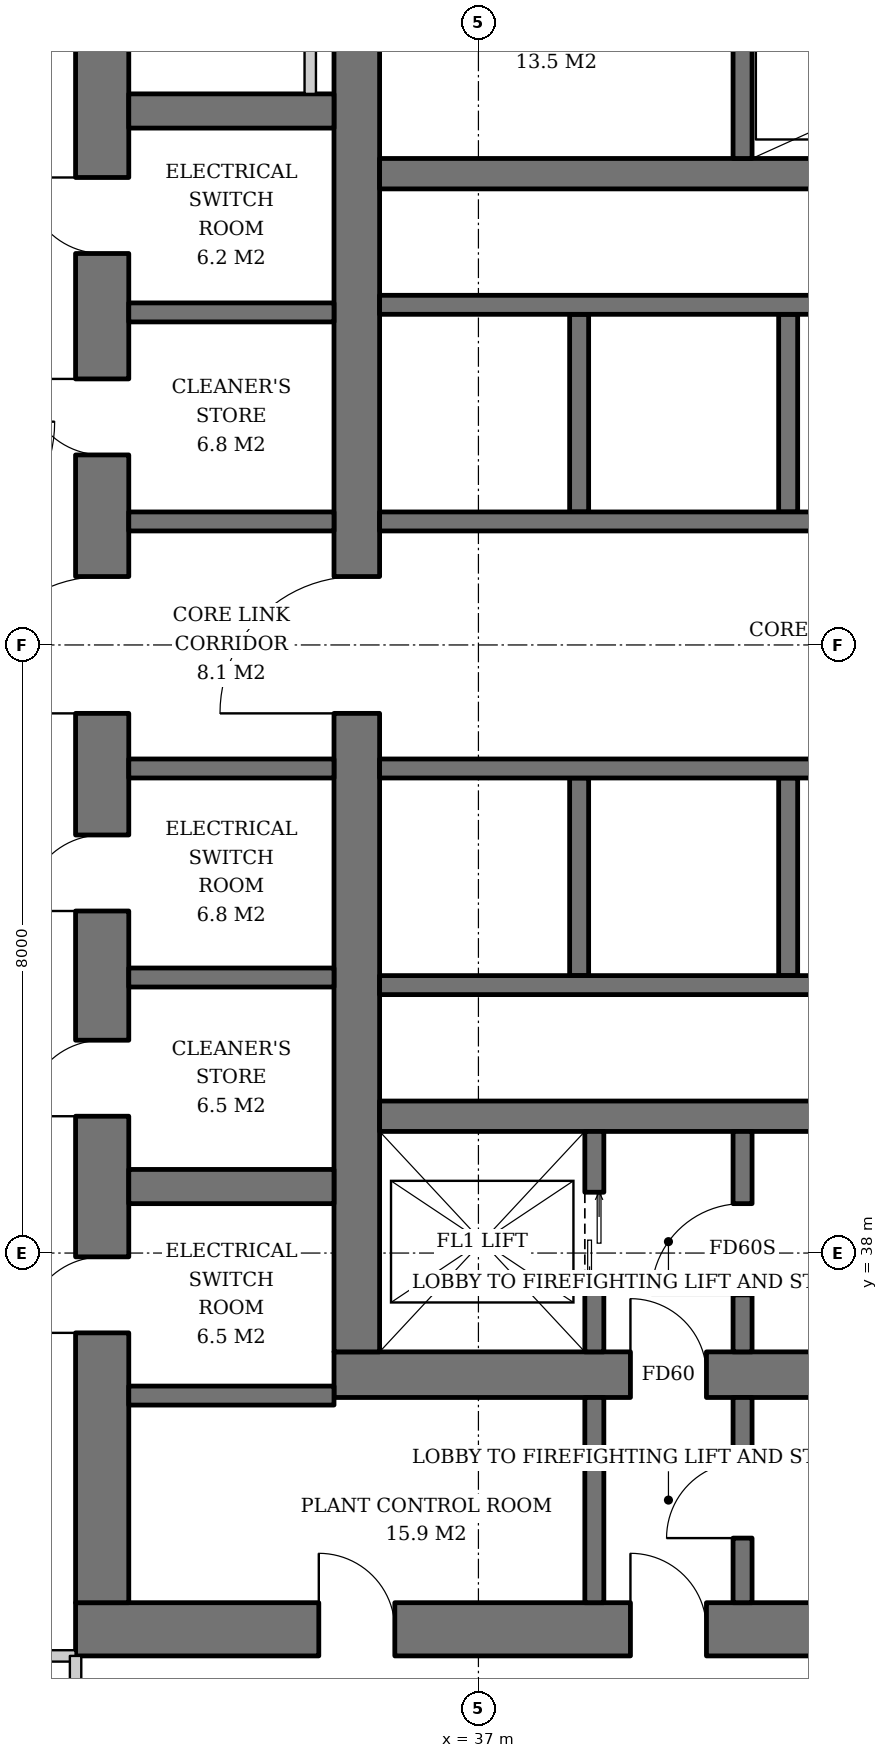
"""IFC4 building model, lengths in metres.
Left out: names, types, materials, properties, quantities, classifications, styles, units other than length and angle.
Written with IfcOpenShell. Run it as: python <this file> out.ifc"""

import sys

from ifc_helpers import new_model, si_unit, direction, frame, frame_2d, origin, origin_2d, place, context, subcontext, project, spatial, rectangle, extrude, element, fill, save


model = new_model("IFC4")
c1 = context("Model", 3, precision=1e-05, world=origin(), true_north=direction((0.0, 1.0)))
c2 = subcontext(c1, "Body", "Model", "MODEL_VIEW")
j1 = project(units=[si_unit("LENGTHUNIT", "METRE"), si_unit("PLANEANGLEUNIT", "RADIAN")], contexts=[c1])
p1 = place(None, origin())
s1 = spatial("IfcSite", under=j1, at=p1, CompositionType="ELEMENT")
p2 = place(p1, origin())
s2 = spatial("IfcBuilding", under=s1, at=p2, CompositionType="ELEMENT")
p3 = place(p2, frame((0.0, 0.0, 161.6)))
s3 = spatial("IfcBuildingStorey", under=s2, at=p3, CompositionType="ELEMENT", Elevation=161.6)
p4 = place(p3, frame((29.593, 30.593, 0.0), z_axis=(0.031964207655, 0.031964207655, 0.998977766949), x_axis=(-0.707106781187, 0.707106781187, 0.0)))
e1 = element("IfcColumn", 1, at=p4, inside=s3, PredefinedType="COLUMN", context=c2, shape_type="SweptSolid", body=[
    extrude(rectangle(XDim=2.4, YDim=2.4, at=origin_2d()), origin(), (0.0, 0.0, 1.0), 3.804),
])
p5 = place(p3, frame((35.1, 36.4, 0.0), z_axis=(0.0, 0.0, 1.0), x_axis=(1.0, 0.0, 0.0)))
e2 = element("IfcWall", 2, at=p5, inside=s3, PredefinedType="SHEAR", context=c2, shape_type="SweptSolid", body=[
    extrude(rectangle(XDim=19.8, YDim=0.6, at=frame_2d((9.9, 0.0))), origin(), (0.0, 0.0, 1.0), 3.8),
])
p6 = place(p5, frame((3.9, 0.0, 0.0)))
e3 = element("IfcOpeningElement", 3, at=p6, cuts=e2, PredefinedType="OPENING", context=c2, shape_type="SweptSolid", body=[
    extrude(rectangle(XDim=1.0, YDim=2.1, at=frame_2d((0.5, 1.05))), frame((0.0, 0.31, 0.0), z_axis=(0.0, -1.0, 0.0), x_axis=(1.0, 0.0, 0.0)), (0.0, 0.0, 1.0), 0.62),
])
p7 = place(p5, frame((15.35, 0.0, 0.0)))
e4 = element("IfcOpeningElement", 4, at=p7, cuts=e2, PredefinedType="OPENING", context=c2, shape_type="SweptSolid", body=[
    extrude(rectangle(XDim=1.0, YDim=2.1, at=frame_2d((0.5, 1.05))), frame((0.0, 0.31, 0.0), z_axis=(0.0, -1.0, 0.0), x_axis=(1.0, 0.0, 0.0)), (0.0, 0.0, 1.0), 0.62),
])
p8 = place(p3, frame((35.4, 36.7, 0.0), z_axis=(0.0, 0.0, 1.0), x_axis=(0.0, 1.0, 0.0)))
e5 = element("IfcWall", 5, at=p8, inside=s3, PredefinedType="SHEAR", context=c2, shape_type="SweptSolid", body=[
    extrude(rectangle(XDim=18.6, YDim=0.6, at=frame_2d((9.3, 0.0))), origin(), (0.0, 0.0, 1.0), 3.8),
])
p9 = place(p8, frame((8.4, 0.0, 0.0)))
e6 = element("IfcOpeningElement", 6, at=p9, cuts=e5, PredefinedType="OPENING", context=c2, shape_type="SweptSolid", body=[
    extrude(rectangle(XDim=1.8, YDim=2.4, at=frame_2d((0.9, 1.2))), frame((0.0, 0.31, 0.0), z_axis=(0.0, -1.0, 0.0), x_axis=(1.0, 0.0, 0.0)), (0.0, 0.0, 1.0), 0.62),
])
p10 = place(p3, frame((31.7, 33.05, 0.0), z_axis=(0.0, 0.0, 1.0), x_axis=(1.0, 0.0, 0.0)))
e7 = element("IfcWall", 7, at=p10, inside=s3, PredefinedType="SHEAR", context=c2, shape_type="SweptSolid", body=[
    extrude(rectangle(XDim=26.6, YDim=0.7, at=frame_2d((13.3, 0.0))), origin(), (0.0, 0.0, 1.0), 3.8),
])
p11 = place(p10, frame((7.3, 0.0, 0.0)))
e8 = element("IfcOpeningElement", 8, at=p11, cuts=e7, PredefinedType="OPENING", context=c2, shape_type="SweptSolid", body=[
    extrude(rectangle(XDim=1.0, YDim=2.1, at=frame_2d((0.5, 1.05))), frame((0.0, 0.36, 0.0), z_axis=(0.0, -1.0, 0.0), x_axis=(1.0, 0.0, 0.0)), (0.0, 0.0, 1.0), 0.72),
])
p12 = place(p10, frame((18.75, 0.0, 0.0)))
e9 = element("IfcOpeningElement", 9, at=p12, cuts=e7, PredefinedType="OPENING", context=c2, shape_type="SweptSolid", body=[
    extrude(rectangle(XDim=1.0, YDim=2.1, at=frame_2d((0.5, 1.05))), frame((0.0, 0.36, 0.0), z_axis=(0.0, -1.0, 0.0), x_axis=(1.0, 0.0, 0.0)), (0.0, 0.0, 1.0), 0.72),
])
p13 = place(p10, frame((3.2, 0.0, 0.0)))
e10 = element("IfcOpeningElement", 10, at=p13, cuts=e7, PredefinedType="OPENING", context=c2, shape_type="SweptSolid", body=[
    extrude(rectangle(XDim=1.0, YDim=2.1, at=frame_2d((0.5, 1.05))), frame((0.0, 0.36, 0.0), z_axis=(0.0, -1.0, 0.0), x_axis=(1.0, 0.0, 0.0)), (0.0, 0.0, 1.0), 0.72),
])
p14 = place(p3, frame((32.05, 33.4, 0.0), z_axis=(0.0, 0.0, 1.0), x_axis=(0.0, 1.0, 0.0)))
e11 = element("IfcWall", 11, at=p14, inside=s3, PredefinedType="SHEAR", context=c2, shape_type="SweptSolid", body=[
    extrude(rectangle(XDim=25.2, YDim=0.7, at=frame_2d((12.6, 0.0))), origin(), (0.0, 0.0, 1.0), 3.8),
])
p15 = place(p14, frame((11.7, 0.0, 0.0)))
e12 = element("IfcOpeningElement", 12, at=p15, cuts=e11, PredefinedType="OPENING", context=c2, shape_type="SweptSolid", body=[
    extrude(rectangle(XDim=1.8, YDim=2.4, at=frame_2d((0.9, 1.2))), frame((0.0, 0.36, 0.0), z_axis=(0.0, -1.0, 0.0), x_axis=(1.0, 0.0, 0.0)), (0.0, 0.0, 1.0), 0.72),
])
p16 = place(p14, frame((3.55, 0.0, 0.0)))
e13 = element("IfcOpeningElement", 13, at=p16, cuts=e11, PredefinedType="OPENING", context=c2, shape_type="SweptSolid", body=[
    extrude(rectangle(XDim=1.0, YDim=2.1, at=frame_2d((0.5, 1.05))), frame((0.0, 0.36, 0.0), z_axis=(0.0, -1.0, 0.0), x_axis=(1.0, 0.0, 0.0)), (0.0, 0.0, 1.0), 0.72),
])
p17 = place(p14, frame((6.4, 0.0, 0.0)))
e14 = element("IfcOpeningElement", 14, at=p17, cuts=e11, PredefinedType="OPENING", context=c2, shape_type="SweptSolid", body=[
    extrude(rectangle(XDim=1.0, YDim=2.1, at=frame_2d((0.5, 1.05))), frame((0.0, 0.36, 0.0), z_axis=(0.0, -1.0, 0.0), x_axis=(1.0, 0.0, 0.0)), (0.0, 0.0, 1.0), 0.72),
])
p18 = place(p14, frame((9.1, 0.0, 0.0)))
e15 = element("IfcOpeningElement", 15, at=p18, cuts=e11, PredefinedType="OPENING", context=c2, shape_type="SweptSolid", body=[
    extrude(rectangle(XDim=1.0, YDim=2.1, at=frame_2d((0.5, 1.05))), frame((0.0, 0.36, 0.0), z_axis=(0.0, -1.0, 0.0), x_axis=(1.0, 0.0, 0.0)), (0.0, 0.0, 1.0), 0.72),
])
p19 = place(p14, frame((15.1, 0.0, 0.0)))
e16 = element("IfcOpeningElement", 16, at=p19, cuts=e11, PredefinedType="OPENING", context=c2, shape_type="SweptSolid", body=[
    extrude(rectangle(XDim=1.0, YDim=2.1, at=frame_2d((0.5, 1.05))), frame((0.0, 0.36, 0.0), z_axis=(0.0, -1.0, 0.0), x_axis=(1.0, 0.0, 0.0)), (0.0, 0.0, 1.0), 0.72),
])
p20 = place(p14, frame((17.75, 0.0, 0.0)))
e17 = element("IfcOpeningElement", 17, at=p20, cuts=e11, PredefinedType="OPENING", context=c2, shape_type="SweptSolid", body=[
    extrude(rectangle(XDim=1.0, YDim=2.1, at=frame_2d((0.5, 1.05))), frame((0.0, 0.36, 0.0), z_axis=(0.0, -1.0, 0.0), x_axis=(1.0, 0.0, 0.0)), (0.0, 0.0, 1.0), 0.72),
])
for number, where, z_axis, x_axis in (
    (18, (35.7, 39.8, 0.0), (0.0, 0.0, 1.0), (1.0, 0.0, 0.0)),
    (19, (35.7, 52.2, 0.0), (0.0, 0.0, 1.0), (1.0, 0.0, 0.0)),
):
    element("IfcWall", number, at=place(p3, frame(where, z_axis=z_axis, x_axis=x_axis)), inside=s3, PredefinedType="SHEAR", context=c2, shape_type="SweptSolid", body=[
        extrude(rectangle(XDim=18.6, YDim=0.4, at=frame_2d((9.3, 0.0))), origin(), (0.0, 0.0, 1.0), 3.8),
    ])
p21 = place(p3, frame((38.525, 36.7, 0.0), z_axis=(0.0, 0.0, 1.0), x_axis=(0.0, 1.0, 0.0)))
e20 = element("IfcWall", 20, at=p21, inside=s3, PredefinedType="SHEAR", context=c2, shape_type="SweptSolid", body=[
    extrude(rectangle(XDim=2.9, YDim=0.25, at=frame_2d((1.45, 0.0))), origin(), (0.0, 0.0, 1.0), 3.8),
])
p22 = place(p21, frame((0.8, 0.0, 0.0)))
e21 = element("IfcOpeningElement", 21, at=p22, cuts=e20, PredefinedType="OPENING", context=c2, shape_type="SweptSolid", body=[
    extrude(rectangle(XDim=1.3, YDim=2.2, at=frame_2d((0.65, 1.1))), frame((0.0, 0.135, 0.0), z_axis=(0.0, -1.0, 0.0), x_axis=(1.0, 0.0, 0.0)), (0.0, 0.0, 1.0), 0.27),
])
p23 = place(p3, frame((40.475, 36.7, 0.0), z_axis=(0.0, 0.0, 1.0), x_axis=(0.0, 1.0, 0.0)))
e22 = element("IfcWall", 22, at=p23, inside=s3, PredefinedType="SHEAR", context=c2, shape_type="SweptSolid", body=[
    extrude(rectangle(XDim=2.9, YDim=0.25, at=frame_2d((1.45, 0.0))), origin(), (0.0, 0.0, 1.0), 3.8),
])
p24 = place(p23, frame((0.75, 0.0, 0.0)))
e23 = element("IfcOpeningElement", 23, at=p24, cuts=e22, PredefinedType="OPENING", context=c2, shape_type="SweptSolid", body=[
    extrude(rectangle(XDim=1.2, YDim=2.1, at=frame_2d((0.6, 1.05))), frame((0.0, 0.135, 0.0), z_axis=(0.0, -1.0, 0.0), x_axis=(1.0, 0.0, 0.0)), (0.0, 0.0, 1.0), 0.27),
])
p25 = place(p3, frame((40.475, 52.4, 0.0), z_axis=(0.0, 0.0, 1.0), x_axis=(0.0, 1.0, 0.0)))
e24 = element("IfcWall", 24, at=p25, inside=s3, PredefinedType="SHEAR", context=c2, shape_type="SweptSolid", body=[
    extrude(rectangle(XDim=2.9, YDim=0.25, at=frame_2d((1.45, 0.0))), origin(), (0.0, 0.0, 1.0), 3.8),
])
for number, where, z_axis, x_axis in (
    (25, (38.325, 47.75, 0.0), (0.0, 0.0, 1.0), (0.0, 1.0, 0.0)),
    (26, (41.075, 47.75, 0.0), (0.0, 0.0, 1.0), (0.0, 1.0, 0.0)),
):
    element("IfcWall", number, at=place(p3, frame(where, z_axis=z_axis, x_axis=x_axis)), inside=s3, PredefinedType="SHEAR", context=c2, shape_type="SweptSolid", body=[
        extrude(rectangle(XDim=2.6, YDim=0.25, at=frame_2d((1.3, 0.0))), origin(), (0.0, 0.0, 1.0), 3.8),
    ])
p26 = place(p3, frame((35.7, 50.475, 0.0), z_axis=(0.0, 0.0, 1.0), x_axis=(1.0, 0.0, 0.0)))
e27 = element("IfcWall", 27, at=p26, inside=s3, PredefinedType="SHEAR", context=c2, shape_type="SweptSolid", body=[
    extrude(rectangle(XDim=11.0, YDim=0.25, at=frame_2d((5.5, 0.0))), origin(), (0.0, 0.0, 1.0), 3.8),
])
p27 = place(p3, frame((35.7, 47.625, 0.0), z_axis=(0.0, 0.0, 1.0), x_axis=(1.0, 0.0, 0.0)))
e28 = element("IfcWall", 28, at=p27, inside=s3, PredefinedType="SHEAR", context=c2, shape_type="SweptSolid", body=[
    extrude(rectangle(XDim=12.83, YDim=0.25, at=frame_2d((6.415, 0.0))), origin(), (0.0, 0.0, 1.0), 3.8),
])
p28 = place(p27, frame((9.0, 0.0, 0.0)))
e29 = element("IfcOpeningElement", 29, at=p28, cuts=e28, PredefinedType="OPENING", context=c2, shape_type="SweptSolid", body=[
    extrude(rectangle(XDim=1.0, YDim=2.1, at=frame_2d((0.5, 1.05))), frame((0.0, 0.135, 0.0), z_axis=(0.0, -1.0, 0.0), x_axis=(1.0, 0.0, 0.0)), (0.0, 0.0, 1.0), 0.27),
])
p29 = place(p27, frame((11.515, 0.0, 0.0)))
e30 = element("IfcOpeningElement", 30, at=p29, cuts=e28, PredefinedType="OPENING", context=c2, shape_type="SweptSolid", body=[
    extrude(rectangle(XDim=0.8, YDim=2.0, at=frame_2d((0.4, 1.0))), frame((0.0, 0.135, 0.0), z_axis=(0.0, -1.0, 0.0), x_axis=(1.0, 0.0, 0.0)), (0.0, 0.0, 1.0), 0.27),
])
for number, where, z_axis, x_axis in (
    (31, (38.325, 44.25, 0.0), (0.0, 0.0, 1.0), (0.0, -1.0, 0.0)),
    (32, (41.075, 44.25, 0.0), (0.0, 0.0, 1.0), (0.0, -1.0, 0.0)),
):
    element("IfcWall", number, at=place(p3, frame(where, z_axis=z_axis, x_axis=x_axis)), inside=s3, PredefinedType="SHEAR", context=c2, shape_type="SweptSolid", body=[
        extrude(rectangle(XDim=2.6, YDim=0.25, at=frame_2d((1.3, 0.0))), origin(), (0.0, 0.0, 1.0), 3.8),
    ])
p30 = place(p3, frame((35.7, 41.525, 0.0), z_axis=(0.0, 0.0, 1.0), x_axis=(1.0, 0.0, 0.0)))
e33 = element("IfcWall", 33, at=p30, inside=s3, PredefinedType="SHEAR", context=c2, shape_type="SweptSolid", body=[
    extrude(rectangle(XDim=11.0, YDim=0.25, at=frame_2d((5.5, 0.0))), origin(), (0.0, 0.0, 1.0), 3.8),
])
p31 = place(p3, frame((35.7, 44.375, 0.0), z_axis=(0.0, 0.0, 1.0), x_axis=(1.0, 0.0, 0.0)))
e34 = element("IfcWall", 34, at=p31, inside=s3, PredefinedType="SHEAR", context=c2, shape_type="SweptSolid", body=[
    extrude(rectangle(XDim=12.83, YDim=0.25, at=frame_2d((6.415, 0.0))), origin(), (0.0, 0.0, 1.0), 3.8),
])
p32 = place(p31, frame((9.0, 0.0, 0.0)))
e35 = element("IfcOpeningElement", 35, at=p32, cuts=e34, PredefinedType="OPENING", context=c2, shape_type="SweptSolid", body=[
    extrude(rectangle(XDim=1.0, YDim=2.1, at=frame_2d((0.5, 1.05))), frame((0.0, 0.135, 0.0), z_axis=(0.0, -1.0, 0.0), x_axis=(1.0, 0.0, 0.0)), (0.0, 0.0, 1.0), 0.27),
])
p33 = place(p31, frame((11.515, 0.0, 0.0)))
e36 = element("IfcOpeningElement", 36, at=p33, cuts=e34, PredefinedType="OPENING", context=c2, shape_type="SweptSolid", body=[
    extrude(rectangle(XDim=0.8, YDim=2.0, at=frame_2d((0.4, 1.0))), frame((0.0, 0.135, 0.0), z_axis=(0.0, -1.0, 0.0), x_axis=(1.0, 0.0, 0.0)), (0.0, 0.0, 1.0), 0.27),
])
p34 = place(p3, frame((32.4, 36.125, 0.0), z_axis=(0.0, 0.0, 1.0), x_axis=(1.0, 0.0, 0.0)))
e37 = element("IfcWall", 37, at=p34, inside=s3, PredefinedType="SHEAR", context=c2, shape_type="SweptSolid", body=[
    extrude(rectangle(XDim=2.7, YDim=0.25, at=frame_2d((1.35, 0.0))), origin(), (0.0, 0.0, 1.0), 3.8),
])
p35 = place(p3, frame((32.4, 38.875, 0.0), z_axis=(0.0, 0.0, 1.0), x_axis=(1.0, 0.0, 0.0)))
e38 = element("IfcWall", 38, at=p35, inside=s3, PredefinedType="SHEAR", context=c2, shape_type="SweptSolid", body=[
    extrude(rectangle(XDim=2.7, YDim=0.45, at=frame_2d((1.35, 0.0))), origin(), (0.0, 0.0, 1.0), 3.8),
])
for number, where, z_axis, x_axis in (
    (39, (32.4, 41.625, 0.0), (0.0, 0.0, 1.0), (1.0, 0.0, 0.0)),
    (40, (32.4, 44.375, 0.0), (0.0, 0.0, 1.0), (1.0, 0.0, 0.0)),
    (41, (32.4, 47.625, 0.0), (0.0, 0.0, 1.0), (1.0, 0.0, 0.0)),
    (42, (32.4, 50.375, 0.0), (0.0, 0.0, 1.0), (1.0, 0.0, 0.0)),
):
    element("IfcWall", number, at=place(p3, frame(where, z_axis=z_axis, x_axis=x_axis)), inside=s3, PredefinedType="SHEAR", context=c2, shape_type="SweptSolid", body=[
        extrude(rectangle(XDim=2.7, YDim=0.25, at=frame_2d((1.35, 0.0))), origin(), (0.0, 0.0, 1.0), 3.8),
    ])
p36 = place(p3, frame((32.4, 53.025, 0.0), z_axis=(0.0, 0.0, 1.0), x_axis=(1.0, 0.0, 0.0)))
e43 = element("IfcWall", 43, at=p36, inside=s3, PredefinedType="SHEAR", context=c2, shape_type="SweptSolid", body=[
    extrude(rectangle(XDim=2.7, YDim=0.45, at=frame_2d((1.35, 0.0))), origin(), (0.0, 0.0, 1.0), 3.8),
])
p37 = place(p3, frame((38.525, 33.4, 0.0), z_axis=(0.0, 0.0, 1.0), x_axis=(0.0, 1.0, 0.0)))
e44 = element("IfcWall", 44, at=p37, inside=s3, PredefinedType="SOLIDWALL", context=c2, shape_type="SweptSolid", body=[
    extrude(rectangle(XDim=2.7, YDim=0.25, at=frame_2d((1.35, 0.0))), origin(), (0.0, 0.0, 1.0), 3.2),
])
p38 = place(p3, frame((40.475, 33.4, 0.0), z_axis=(0.0, 0.0, 1.0), x_axis=(0.0, 1.0, 0.0)))
e45 = element("IfcWall", 45, at=p38, inside=s3, PredefinedType="SOLIDWALL", context=c2, shape_type="SweptSolid", body=[
    extrude(rectangle(XDim=2.7, YDim=0.25, at=frame_2d((1.35, 0.0))), origin(), (0.0, 0.0, 1.0), 3.2),
])
p39 = place(p38, frame((0.85, 0.0, 0.0)))
e46 = element("IfcOpeningElement", 46, at=p39, cuts=e45, PredefinedType="OPENING", context=c2, shape_type="SweptSolid", body=[
    extrude(rectangle(XDim=1.0, YDim=2.1, at=frame_2d((0.5, 1.05))), frame((0.0, 0.135, 0.0), z_axis=(0.0, -1.0, 0.0), x_axis=(1.0, 0.0, 0.0)), (0.0, 0.0, 1.0), 0.27),
])
p40 = place(p3, frame((34.788, 53.25, 0.0), z_axis=(0.0, 0.0, 1.0), x_axis=(0.0, 1.0, 0.0)))
e47 = element("IfcWall", 47, at=p40, inside=s3, PredefinedType="SOLIDWALL", context=c2, shape_type="SweptSolid", body=[
    extrude(rectangle(XDim=5.35, YDim=0.15, at=frame_2d((2.675, 0.0))), origin(), (0.0, 0.0, 1.0), 3.2),
])
for number, where, z_axis, x_axis in (
    (48, (31.7, 32.7, 0.0), (0.0, 0.0, 1.0), (-1.0, 0.0, 0.0)),
    (49, (31.7, 32.7, 0.0), (0.0, 0.0, 1.0), (0.0, -1.0, 0.0)),
):
    element("IfcWall", number, at=place(p3, frame(where, z_axis=z_axis, x_axis=x_axis)), inside=s3, PredefinedType="PARTITIONING", context=c2, shape_type="SweptSolid", body=[
        extrude(rectangle(XDim=1.829, YDim=0.15, at=frame_2d((0.915, 0.0))), origin(), (0.0, 0.0, 1.0), 3.6),
    ])
p41 = place(p22, origin())
e50 = element("IfcDoor", 50, at=p41, inside=s3, OperationType="DOUBLE_DOOR_SLIDING", PredefinedType="DOOR", context=c2, shape_type="SweptSolid", body=[
    extrude(rectangle(XDim=1.3, YDim=2.2, at=frame_2d((0.65, 1.1))), frame((0.0, 0.025, 0.0), z_axis=(0.0, -1.0, 0.0), x_axis=(1.0, 0.0, 0.0)), (0.0, 0.0, 1.0), 0.05),
])
fill(e21, e50)
p42 = place(p24, origin())
e51 = element("IfcDoor", 51, at=p42, inside=s3, OperationType="SINGLE_SWING_LEFT", PredefinedType="DOOR", context=c2, shape_type="SweptSolid", body=[
    extrude(rectangle(XDim=1.2, YDim=2.1, at=frame_2d((0.6, 1.05))), frame((0.0, 0.025, 0.0), z_axis=(0.0, -1.0, 0.0), x_axis=(1.0, 0.0, 0.0)), (0.0, 0.0, 1.0), 0.05),
])
fill(e23, e51)
p43 = place(p39, origin())
e52 = element("IfcDoor", 52, at=p43, inside=s3, OperationType="SINGLE_SWING_LEFT", PredefinedType="DOOR", context=c2, shape_type="SweptSolid", body=[
    extrude(rectangle(XDim=1.0, YDim=2.1, at=frame_2d((0.5, 1.05))), frame((0.0, 0.025, 0.0), z_axis=(0.0, -1.0, 0.0), x_axis=(1.0, 0.0, 0.0)), (0.0, 0.0, 1.0), 0.05),
])
fill(e46, e52)
p44 = place(p6, origin())
e53 = element("IfcDoor", 53, at=p44, inside=s3, OperationType="SINGLE_SWING_LEFT", PredefinedType="DOOR", context=c2, shape_type="SweptSolid", body=[
    extrude(rectangle(XDim=1.0, YDim=2.1, at=frame_2d((0.5, 1.05))), frame((0.0, 0.025, 0.0), z_axis=(0.0, -1.0, 0.0), x_axis=(1.0, 0.0, 0.0)), (0.0, 0.0, 1.0), 0.05),
])
fill(e3, e53)
p45 = place(p9, origin())
e54 = element("IfcDoor", 54, at=p45, inside=s3, OperationType="DOUBLE_DOOR_SINGLE_SWING", PredefinedType="DOOR", context=c2, shape_type="SweptSolid", body=[
    extrude(rectangle(XDim=1.8, YDim=2.4, at=frame_2d((0.9, 1.2))), frame((0.0, 0.025, 0.0), z_axis=(0.0, -1.0, 0.0), x_axis=(1.0, 0.0, 0.0)), (0.0, 0.0, 1.0), 0.05),
])
fill(e6, e54)
p46 = place(p15, origin())
e55 = element("IfcDoor", 55, at=p46, inside=s3, OperationType="DOUBLE_DOOR_SINGLE_SWING", PredefinedType="DOOR", context=c2, shape_type="SweptSolid", body=[
    extrude(rectangle(XDim=1.8, YDim=2.4, at=frame_2d((0.9, 1.2))), frame((0.0, 0.025, 0.0), z_axis=(0.0, -1.0, 0.0), x_axis=(1.0, 0.0, 0.0)), (0.0, 0.0, 1.0), 0.05),
])
fill(e12, e55)
p47 = place(p11, origin())
e56 = element("IfcDoor", 56, at=p47, inside=s3, OperationType="SINGLE_SWING_LEFT", PredefinedType="DOOR", context=c2, shape_type="SweptSolid", body=[
    extrude(rectangle(XDim=1.0, YDim=2.1, at=frame_2d((0.5, 1.05))), frame((0.0, 0.025, 0.0), z_axis=(0.0, -1.0, 0.0), x_axis=(1.0, 0.0, 0.0)), (0.0, 0.0, 1.0), 0.05),
])
fill(e8, e56)
p48 = place(p16, origin())
e57 = element("IfcDoor", 57, at=p48, inside=s3, OperationType="SINGLE_SWING_LEFT", PredefinedType="DOOR", context=c2, shape_type="SweptSolid", body=[
    extrude(rectangle(XDim=1.0, YDim=2.1, at=frame_2d((0.5, 1.05))), frame((0.0, -0.29, 0.0), z_axis=(0.0, -1.0, 0.0), x_axis=(1.0, 0.0, 0.0)), (0.0, 0.0, 1.0), 0.05),
])
fill(e13, e57)
p49 = place(p17, origin())
e58 = element("IfcDoor", 58, at=p49, inside=s3, OperationType="SINGLE_SWING_LEFT", PredefinedType="DOOR", context=c2, shape_type="SweptSolid", body=[
    extrude(rectangle(XDim=1.0, YDim=2.1, at=frame_2d((0.5, 1.05))), frame((0.0, -0.29, 0.0), z_axis=(0.0, -1.0, 0.0), x_axis=(1.0, 0.0, 0.0)), (0.0, 0.0, 1.0), 0.05),
])
fill(e14, e58)
p50 = place(p18, origin())
e59 = element("IfcDoor", 59, at=p50, inside=s3, OperationType="SINGLE_SWING_LEFT", PredefinedType="DOOR", context=c2, shape_type="SweptSolid", body=[
    extrude(rectangle(XDim=1.0, YDim=2.1, at=frame_2d((0.5, 1.05))), frame((0.0, -0.29, 0.0), z_axis=(0.0, -1.0, 0.0), x_axis=(1.0, 0.0, 0.0)), (0.0, 0.0, 1.0), 0.05),
])
fill(e15, e59)
p51 = place(p19, origin())
e60 = element("IfcDoor", 60, at=p51, inside=s3, OperationType="SINGLE_SWING_RIGHT", PredefinedType="DOOR", context=c2, shape_type="SweptSolid", body=[
    extrude(rectangle(XDim=1.0, YDim=2.1, at=frame_2d((0.5, 1.05))), frame((0.0, -0.29, 0.0), z_axis=(0.0, -1.0, 0.0), x_axis=(1.0, 0.0, 0.0)), (0.0, 0.0, 1.0), 0.05),
])
fill(e16, e60)
p52 = place(p20, origin())
e61 = element("IfcDoor", 61, at=p52, inside=s3, OperationType="SINGLE_SWING_RIGHT", PredefinedType="DOOR", context=c2, shape_type="SweptSolid", body=[
    extrude(rectangle(XDim=1.0, YDim=2.1, at=frame_2d((0.5, 1.05))), frame((0.0, -0.29, 0.0), z_axis=(0.0, -1.0, 0.0), x_axis=(1.0, 0.0, 0.0)), (0.0, 0.0, 1.0), 0.05),
])
fill(e17, e61)
p53 = place(p13, origin())
e62 = element("IfcDoor", 62, at=p53, inside=s3, OperationType="SINGLE_SWING_LEFT", PredefinedType="DOOR", context=c2, shape_type="SweptSolid", body=[
    extrude(rectangle(XDim=1.0, YDim=2.1, at=frame_2d((0.5, 1.05))), frame((0.0, 0.34, 0.0), z_axis=(0.0, -1.0, 0.0), x_axis=(1.0, 0.0, 0.0)), (0.0, 0.0, 1.0), 0.05),
])
fill(e10, e62)
save(model, sys.argv[1])
